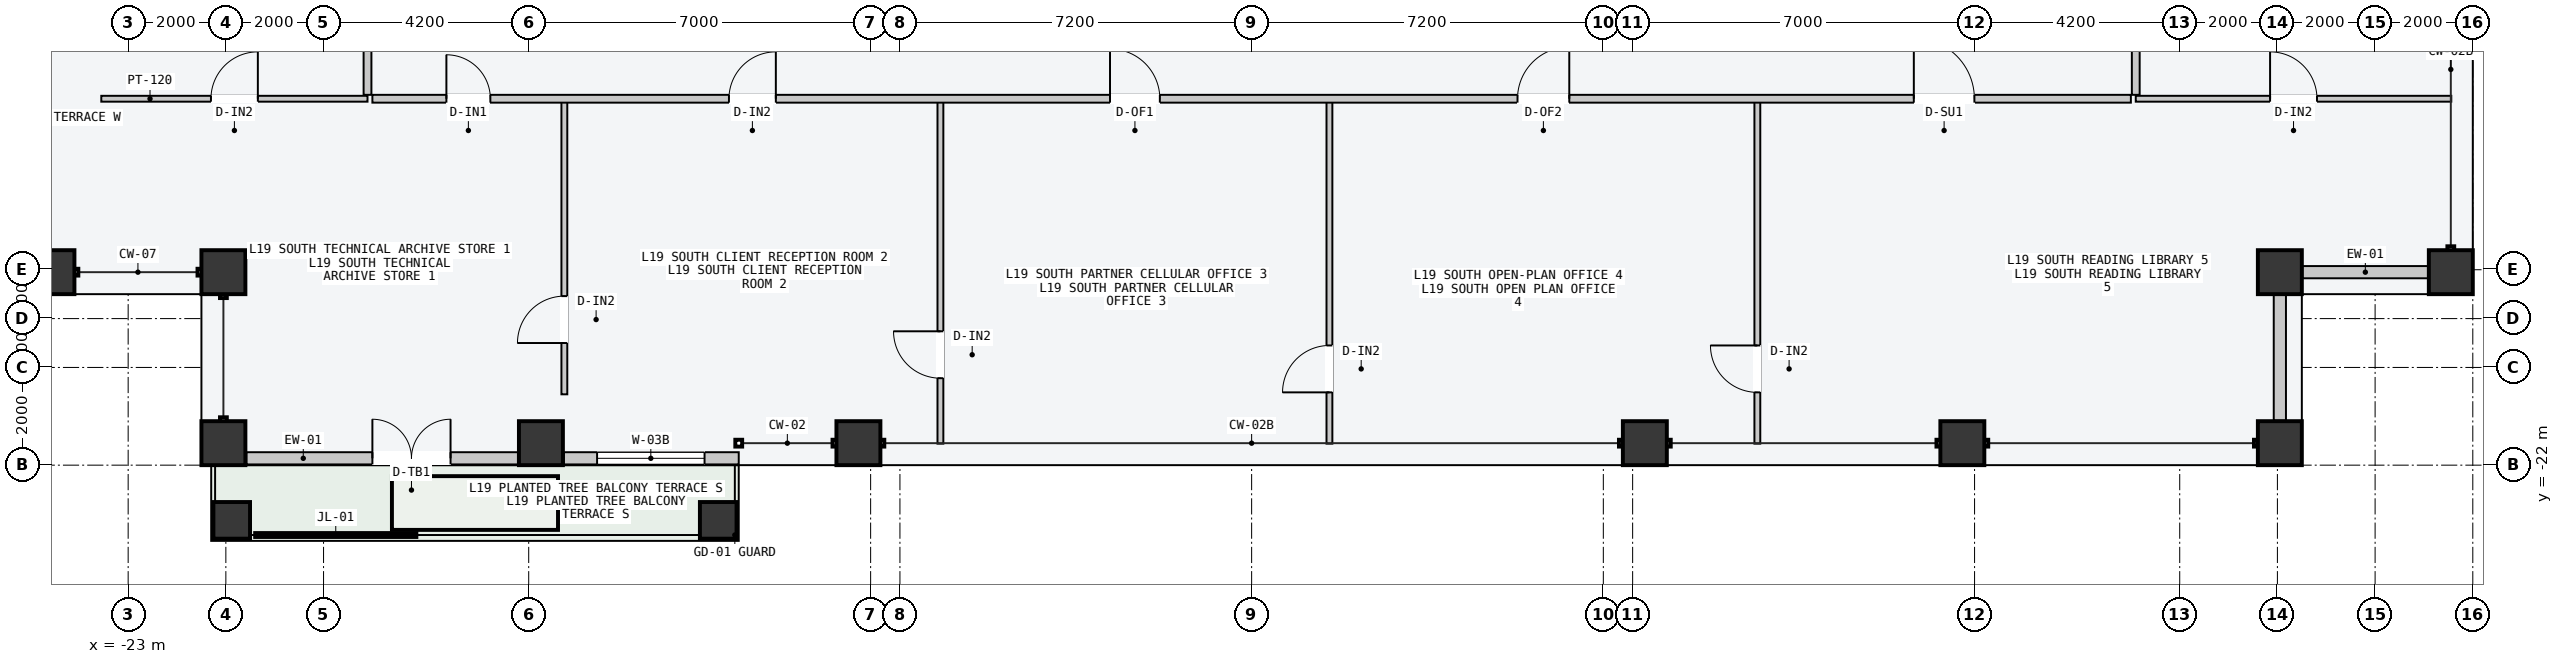
"""IFC4 building model, lengths in metres.
Left out: names, types, materials, properties, quantities, classifications, styles, units other than length and angle.
Written with IfcOpenShell. Run it as: python <this file> out.ifc"""

import sys

from ifc_helpers import new_model, si_unit, direction, frame, frame_2d, origin, origin_2d, place, context, subcontext, project, spatial, rectangle, hollow_rectangle, extrude, element, fill, save


model = new_model("IFC4")
c1 = context("Model", 3, precision=1e-05, world=origin(), true_north=direction((0.0, 1.0)))
c2 = subcontext(c1, "Body", "Model", "MODEL_VIEW")
j1 = project(units=[si_unit("LENGTHUNIT", "METRE"), si_unit("PLANEANGLEUNIT", "RADIAN")], contexts=[c1])
p1 = place(None, origin())
s1 = spatial("IfcSite", under=j1, at=p1, CompositionType="ELEMENT")
p2 = place(p1, origin())
s2 = spatial("IfcBuilding", under=s1, at=p2, CompositionType="ELEMENT")
p3 = place(p2, frame((0.0, 0.0, 74.4)))
s3 = spatial("IfcBuildingStorey", under=s2, at=p3, CompositionType="ELEMENT", Elevation=74.4)
for number, where, z_axis, x_axis in (
    (1, (-21.05, -21.55, 0.0), (0.0, 0.0, 1.0), (1.0, 0.0, 0.0)),
    (2, (-14.55, -21.55, 0.0), (0.0, 0.0, 1.0), (1.0, 0.0, 0.0)),
    (3, (-8.05, -21.55, 0.0), (0.0, 0.0, 1.0), (1.0, 0.0, 0.0)),
    (4, (8.05, -21.55, 0.0), (0.0, 0.0, 1.0), (1.0, 0.0, 0.0)),
    (5, (14.55, -21.55, 0.0), (0.0, 0.0, 1.0), (1.0, 0.0, 0.0)),
    (6, (21.05, -21.55, 0.0), (0.0, 0.0, 1.0), (1.0, 0.0, 0.0)),
    (7, (-24.55, -18.05, 0.0), (0.0, 0.0, 1.0), (0.0, 1.0, 0.0)),
    (8, (24.55, -18.05, 0.0), (0.0, 0.0, 1.0), (0.0, 1.0, 0.0)),
    (9, (21.05, -18.05, 0.0), (0.0, 0.0, 1.0), (1.0, 0.0, 0.0)),
    (10, (-21.05, -18.05, 0.0), (0.0, 0.0, 1.0), (1.0, 0.0, 0.0)),
):
    element("IfcColumn", number, at=place(p3, frame(where, z_axis=z_axis, x_axis=x_axis)), inside=s3, PredefinedType="COLUMN", context=c2, shape_type="SweptSolid", body=[
        extrude(hollow_rectangle(XDim=0.9, YDim=0.9, WallThickness=0.045, at=origin_2d()), origin(), (0.0, 0.0, 1.0), 3.6),
    ])
for number, where, z_axis, x_axis in (
    (11, (-20.88, -23.13, 0.0), (0.0, 0.0, 1.0), (1.0, 0.0, 0.0)),
    (12, (-10.92, -23.13, 0.0), (0.0, 0.0, 1.0), (1.0, 0.0, 0.0)),
):
    element("IfcColumn", number, at=place(p3, frame(where, z_axis=z_axis, x_axis=x_axis)), inside=s3, PredefinedType="COLUMN", context=c2, shape_type="SweptSolid", body=[
        extrude(hollow_rectangle(XDim=0.75, YDim=0.75, WallThickness=0.032, at=origin_2d()), origin(), (0.0, 0.0, 1.0), 3.6),
    ])
p4 = place(p3, frame((-20.58, -21.86, 0.0), z_axis=(0.0, 0.0, 1.0), x_axis=(1.0, 0.0, 0.0)))
e13 = element("IfcWall", 13, at=p4, inside=s3, PredefinedType="STANDARD", context=c2, shape_type="SweptSolid", body=[
    extrude(rectangle(XDim=5.56, YDim=0.25, at=frame_2d((2.78, 0.0))), origin(), (0.0, 0.0, 1.0), 3.4),
])
p5 = place(p4, frame((2.58, 0.0, 0.0)))
e14 = element("IfcOpeningElement", 14, at=p5, cuts=e13, PredefinedType="OPENING", context=c2, shape_type="SweptSolid", body=[
    extrude(rectangle(XDim=1.6, YDim=2.2, at=frame_2d((0.8, 1.1))), frame((0.0, 0.135, 0.0), z_axis=(0.0, -1.0, 0.0), x_axis=(1.0, 0.0, 0.0)), (0.0, 0.0, 1.0), 0.27),
])
p6 = place(p3, frame((-14.08, -21.86, 0.0), z_axis=(0.0, 0.0, 1.0), x_axis=(1.0, 0.0, 0.0)))
e15 = element("IfcWall", 15, at=p6, inside=s3, PredefinedType="STANDARD", context=c2, shape_type="SweptSolid", body=[
    extrude(rectangle(XDim=3.58, YDim=0.25, at=frame_2d((1.79, 0.0))), origin(), (0.0, 0.0, 1.0), 3.4),
])
p7 = place(p6, frame((0.68, 0.0, 0.85)))
e16 = element("IfcOpeningElement", 16, at=p7, cuts=e15, PredefinedType="OPENING", context=c2, shape_type="SweptSolid", body=[
    extrude(rectangle(XDim=2.2, YDim=2.1, at=frame_2d((1.1, 1.05))), frame((0.0, 0.135, 0.0), z_axis=(0.0, -1.0, 0.0), x_axis=(1.0, 0.0, 0.0)), (0.0, 0.0, 1.0), 0.27),
])
for number, where, z_axis, x_axis in (
    (17, (21.51, -18.05, 0.0), (0.0, 0.0, 1.0), (1.0, 0.0, 0.0)),
    (18, (21.05, -21.09, 0.0), (0.0, 0.0, 1.0), (0.0, 1.0, 0.0)),
):
    element("IfcWall", number, at=place(p3, frame(where, z_axis=z_axis, x_axis=x_axis)), inside=s3, PredefinedType="STANDARD", context=c2, shape_type="SweptSolid", body=[
        extrude(rectangle(XDim=2.58, YDim=0.25, at=frame_2d((1.29, 0.0))), origin(), (0.0, 0.0, 1.0), 2.7),
    ])
p8 = place(p3, frame((-14.07, -20.55, 0.0), z_axis=(0.0, 0.0, 1.0), x_axis=(0.0, 1.0, 0.0)))
e19 = element("IfcWall", 19, at=p8, inside=s3, PredefinedType="PARTITIONING", context=c2, shape_type="SweptSolid", body=[
    extrude(rectangle(XDim=5.99, YDim=0.12, at=frame_2d((2.995, 0.0))), origin(), (0.0, 0.0, 1.0), 3.4),
])
p9 = place(p8, frame((1.05, 0.0, 0.0)))
e20 = element("IfcOpeningElement", 20, at=p9, cuts=e19, PredefinedType="OPENING", context=c2, shape_type="SweptSolid", body=[
    extrude(rectangle(XDim=0.96, YDim=2.18, at=frame_2d((0.48, 1.09))), frame((0.0, 0.07, 0.0), z_axis=(0.0, -1.0, 0.0), x_axis=(1.0, 0.0, 0.0)), (0.0, 0.0, 1.0), 0.14),
])
p10 = place(p3, frame((-6.371, -21.56, 0.0), z_axis=(0.0, 0.0, 1.0), x_axis=(0.0, 1.0, 0.0)))
e21 = element("IfcWall", 21, at=p10, inside=s3, PredefinedType="PARTITIONING", context=c2, shape_type="SweptSolid", body=[
    extrude(rectangle(XDim=7.0, YDim=0.12, at=frame_2d((3.5, 0.0))), origin(), (0.0, 0.0, 1.0), 3.4),
])
p11 = place(p10, frame((1.34, 0.0, 0.0)))
e22 = element("IfcOpeningElement", 22, at=p11, cuts=e21, PredefinedType="OPENING", context=c2, shape_type="SweptSolid", body=[
    extrude(rectangle(XDim=0.96, YDim=2.18, at=frame_2d((0.48, 1.09))), frame((0.0, 0.07, 0.0), z_axis=(0.0, -1.0, 0.0), x_axis=(1.0, 0.0, 0.0)), (0.0, 0.0, 1.0), 0.14),
])
p12 = place(p3, frame((1.593, -21.56, 0.0), z_axis=(0.0, 0.0, 1.0), x_axis=(0.0, 1.0, 0.0)))
e23 = element("IfcWall", 23, at=p12, inside=s3, PredefinedType="PARTITIONING", context=c2, shape_type="SweptSolid", body=[
    extrude(rectangle(XDim=7.0, YDim=0.12, at=frame_2d((3.5, 0.0))), origin(), (0.0, 0.0, 1.0), 3.4),
])
p13 = place(p12, frame((1.05, 0.0, 0.0)))
e24 = element("IfcOpeningElement", 24, at=p13, cuts=e23, PredefinedType="OPENING", context=c2, shape_type="SweptSolid", body=[
    extrude(rectangle(XDim=0.96, YDim=2.18, at=frame_2d((0.48, 1.09))), frame((0.0, 0.07, 0.0), z_axis=(0.0, -1.0, 0.0), x_axis=(1.0, 0.0, 0.0)), (0.0, 0.0, 1.0), 0.14),
])
p14 = place(p3, frame((10.353, -21.56, 0.0), z_axis=(0.0, 0.0, 1.0), x_axis=(0.0, 1.0, 0.0)))
e25 = element("IfcWall", 25, at=p14, inside=s3, PredefinedType="PARTITIONING", context=c2, shape_type="SweptSolid", body=[
    extrude(rectangle(XDim=7.0, YDim=0.12, at=frame_2d((3.5, 0.0))), origin(), (0.0, 0.0, 1.0), 3.4),
])
p15 = place(p14, frame((1.05, 0.0, 0.0)))
e26 = element("IfcOpeningElement", 26, at=p15, cuts=e25, PredefinedType="OPENING", context=c2, shape_type="SweptSolid", body=[
    extrude(rectangle(XDim=0.96, YDim=2.18, at=frame_2d((0.48, 1.09))), frame((0.0, 0.07, 0.0), z_axis=(0.0, -1.0, 0.0), x_axis=(1.0, 0.0, 0.0)), (0.0, 0.0, 1.0), 0.14),
])
p16 = place(p3, frame((-18.0, -14.5, 0.0), z_axis=(0.0, 0.0, 1.0), x_axis=(1.0, 0.0, 0.0)))
e27 = element("IfcWall", 27, at=p16, inside=s3, PredefinedType="PARTITIONING", context=c2, shape_type="SweptSolid", body=[
    extrude(rectangle(XDim=36.0, YDim=0.16, at=frame_2d((18.0, 0.0))), origin(), (0.0, 0.0, 1.0), 3.4),
])
p17 = place(p16, frame((1.515, 0.0, 0.0)))
e28 = element("IfcOpeningElement", 28, at=p17, cuts=e27, PredefinedType="OPENING", context=c2, shape_type="SweptSolid", body=[
    extrude(rectangle(XDim=0.9, YDim=2.15, at=frame_2d((0.45, 1.075))), frame((0.0, 0.09, 0.0), z_axis=(0.0, -1.0, 0.0), x_axis=(1.0, 0.0, 0.0)), (0.0, 0.0, 1.0), 0.18),
])
p18 = place(p16, frame((7.299, 0.0, 0.0)))
e29 = element("IfcOpeningElement", 29, at=p18, cuts=e27, PredefinedType="OPENING", context=c2, shape_type="SweptSolid", body=[
    extrude(rectangle(XDim=0.96, YDim=2.18, at=frame_2d((0.48, 1.09))), frame((0.0, 0.09, 0.0), z_axis=(0.0, -1.0, 0.0), x_axis=(1.0, 0.0, 0.0)), (0.0, 0.0, 1.0), 0.18),
])
p19 = place(p16, frame((15.101, 0.0, 0.0)))
e30 = element("IfcOpeningElement", 30, at=p19, cuts=e27, PredefinedType="OPENING", context=c2, shape_type="SweptSolid", body=[
    extrude(rectangle(XDim=1.02, YDim=2.2, at=frame_2d((0.51, 1.1))), frame((0.0, 0.09, 0.0), z_axis=(0.0, -1.0, 0.0), x_axis=(1.0, 0.0, 0.0)), (0.0, 0.0, 1.0), 0.18),
])
p20 = place(p16, frame((23.443, 0.0, 0.0)))
e31 = element("IfcOpeningElement", 31, at=p20, cuts=e27, PredefinedType="OPENING", context=c2, shape_type="SweptSolid", body=[
    extrude(rectangle(XDim=1.06, YDim=2.2, at=frame_2d((0.53, 1.1))), frame((0.0, 0.09, 0.0), z_axis=(0.0, -1.0, 0.0), x_axis=(1.0, 0.0, 0.0)), (0.0, 0.0, 1.0), 0.18),
])
p21 = place(p16, frame((31.557, 0.0, 0.0)))
e32 = element("IfcOpeningElement", 32, at=p21, cuts=e27, PredefinedType="OPENING", context=c2, shape_type="SweptSolid", body=[
    extrude(rectangle(XDim=1.24, YDim=2.24, at=frame_2d((0.62, 1.12))), frame((0.0, 0.09, 0.0), z_axis=(0.0, -1.0, 0.0), x_axis=(1.0, 0.0, 0.0)), (0.0, 0.0, 1.0), 0.18),
])
p22 = place(p3, frame((-23.55, -14.5, 0.0), z_axis=(0.0, 0.0, 1.0), x_axis=(1.0, 0.0, 0.0)))
e33 = element("IfcWall", 33, at=p22, inside=s3, PredefinedType="PARTITIONING", context=c2, shape_type="SweptSolid", body=[
    extrude(rectangle(XDim=5.45, YDim=0.12, at=frame_2d((2.725, 0.0))), origin(), (0.0, 0.0, 1.0), 3.4),
])
p23 = place(p22, frame((2.245, 0.0, 0.0)))
e34 = element("IfcOpeningElement", 34, at=p23, cuts=e33, PredefinedType="OPENING", context=c2, shape_type="SweptSolid", body=[
    extrude(rectangle(XDim=0.96, YDim=2.18, at=frame_2d((0.48, 1.09))), frame((0.0, 0.07, 0.0), z_axis=(0.0, -1.0, 0.0), x_axis=(1.0, 0.0, 0.0)), (0.0, 0.0, 1.0), 0.14),
])
p24 = place(p3, frame((18.1, -14.5, 0.0), z_axis=(0.0, 0.0, 1.0), x_axis=(1.0, 0.0, 0.0)))
e35 = element("IfcWall", 35, at=p24, inside=s3, PredefinedType="PARTITIONING", context=c2, shape_type="SweptSolid", body=[
    extrude(rectangle(XDim=6.46, YDim=0.12, at=frame_2d((3.23, 0.0))), origin(), (0.0, 0.0, 1.0), 3.4),
])
p25 = place(p24, frame((2.75, 0.0, 0.0)))
e36 = element("IfcOpeningElement", 36, at=p25, cuts=e35, PredefinedType="OPENING", context=c2, shape_type="SweptSolid", body=[
    extrude(rectangle(XDim=0.96, YDim=2.18, at=frame_2d((0.48, 1.09))), frame((0.0, 0.07, 0.0), z_axis=(0.0, -1.0, 0.0), x_axis=(1.0, 0.0, 0.0)), (0.0, 0.0, 1.0), 0.14),
])
p26 = place(p3, frame((-18.1, -14.42, 0.0), z_axis=(0.0, 0.0, 1.0), x_axis=(0.0, 1.0, 0.0)))
e37 = element("IfcWall", 37, at=p26, inside=s3, PredefinedType="PARTITIONING", context=c2, shape_type="SweptSolid", body=[
    extrude(rectangle(XDim=28.84, YDim=0.16, at=frame_2d((14.42, 0.0))), origin(), (0.0, 0.0, 1.0), 3.4),
])
p27 = place(p26, frame((5.725, 0.0, 0.0)))
e38 = element("IfcOpeningElement", 38, at=p27, cuts=e37, PredefinedType="OPENING", context=c2, shape_type="SweptSolid", body=[
    extrude(rectangle(XDim=1.24, YDim=2.24, at=frame_2d((0.62, 1.12))), frame((0.0, 0.09, 0.0), z_axis=(0.0, -1.0, 0.0), x_axis=(1.0, 0.0, 0.0)), (0.0, 0.0, 1.0), 0.18),
])
p28 = place(p26, frame((16.46, 0.0, 0.0)))
e39 = element("IfcOpeningElement", 39, at=p28, cuts=e37, PredefinedType="OPENING", context=c2, shape_type="SweptSolid", body=[
    extrude(rectangle(XDim=1.4, YDim=2.2, at=frame_2d((0.7, 1.1))), frame((0.0, 0.09, 0.0), z_axis=(0.0, -1.0, 0.0), x_axis=(1.0, 0.0, 0.0)), (0.0, 0.0, 1.0), 0.18),
])
p29 = place(p26, frame((24.785, 0.0, 0.0)))
e40 = element("IfcOpeningElement", 40, at=p29, cuts=e37, PredefinedType="OPENING", context=c2, shape_type="SweptSolid", body=[
    extrude(rectangle(XDim=0.9, YDim=2.15, at=frame_2d((0.45, 1.075))), frame((0.0, 0.09, 0.0), z_axis=(0.0, -1.0, 0.0), x_axis=(1.0, 0.0, 0.0)), (0.0, 0.0, 1.0), 0.18),
])
p30 = place(p3, frame((18.1, -14.42, 0.0), z_axis=(0.0, 0.0, 1.0), x_axis=(0.0, 1.0, 0.0)))
e41 = element("IfcWall", 41, at=p30, inside=s3, PredefinedType="PARTITIONING", context=c2, shape_type="SweptSolid", body=[
    extrude(rectangle(XDim=28.84, YDim=0.16, at=frame_2d((14.42, 0.0))), origin(), (0.0, 0.0, 1.0), 3.4),
])
p31 = place(p30, frame((13.8, 0.0, 0.0)))
e42 = element("IfcOpeningElement", 42, at=p31, cuts=e41, PredefinedType="OPENING", context=c2, shape_type="SweptSolid", body=[
    extrude(rectangle(XDim=1.24, YDim=2.24, at=frame_2d((0.62, 1.12))), frame((0.0, 0.09, 0.0), z_axis=(0.0, -1.0, 0.0), x_axis=(1.0, 0.0, 0.0)), (0.0, 0.0, 1.0), 0.18),
])
p32 = place(p5, origin())
e43 = element("IfcDoor", 43, at=p32, inside=s3, OperationType="DOUBLE_DOOR_SINGLE_SWING", PredefinedType="DOOR", context=c2, shape_type="SweptSolid", body=[
    extrude(rectangle(XDim=1.6, YDim=2.2, at=frame_2d((0.8, 1.1))), frame((0.0, 0.025, 0.0), z_axis=(0.0, -1.0, 0.0), x_axis=(1.0, 0.0, 0.0)), (0.0, 0.0, 1.0), 0.05),
])
fill(e14, e43)
p33 = place(p7, origin())
e44 = element("IfcWindow", 44, at=p33, inside=s3, PartitioningType="SINGLE_PANEL", PredefinedType="WINDOW", context=c2, shape_type="SweptSolid", body=[
    extrude(rectangle(XDim=2.2, YDim=2.1, at=frame_2d((1.1, 1.05))), frame((0.0, 0.03, 0.0), z_axis=(0.0, -1.0, 0.0), x_axis=(1.0, 0.0, 0.0)), (0.0, 0.0, 1.0), 0.06),
])
fill(e16, e44)
p34 = place(p9, origin())
e45 = element("IfcDoor", 45, at=p34, inside=s3, OperationType="SINGLE_SWING_LEFT", PredefinedType="DOOR", context=c2, shape_type="SweptSolid", body=[
    extrude(rectangle(XDim=0.96, YDim=2.18, at=frame_2d((0.48, 1.09))), frame((0.0, 0.025, 0.0), z_axis=(0.0, -1.0, 0.0), x_axis=(1.0, 0.0, 0.0)), (0.0, 0.0, 1.0), 0.05),
])
fill(e20, e45)
p35 = place(p11, origin())
e46 = element("IfcDoor", 46, at=p35, inside=s3, OperationType="SINGLE_SWING_RIGHT", PredefinedType="DOOR", context=c2, shape_type="SweptSolid", body=[
    extrude(rectangle(XDim=0.96, YDim=2.18, at=frame_2d((0.48, 1.09))), frame((0.0, 0.025, 0.0), z_axis=(0.0, -1.0, 0.0), x_axis=(1.0, 0.0, 0.0)), (0.0, 0.0, 1.0), 0.05),
])
fill(e22, e46)
p36 = place(p13, origin())
e47 = element("IfcDoor", 47, at=p36, inside=s3, OperationType="SINGLE_SWING_LEFT", PredefinedType="DOOR", context=c2, shape_type="SweptSolid", body=[
    extrude(rectangle(XDim=0.96, YDim=2.18, at=frame_2d((0.48, 1.09))), frame((0.0, 0.025, 0.0), z_axis=(0.0, -1.0, 0.0), x_axis=(1.0, 0.0, 0.0)), (0.0, 0.0, 1.0), 0.05),
])
fill(e24, e47)
p37 = place(p15, origin())
e48 = element("IfcDoor", 48, at=p37, inside=s3, OperationType="SINGLE_SWING_RIGHT", PredefinedType="DOOR", context=c2, shape_type="SweptSolid", body=[
    extrude(rectangle(XDim=0.96, YDim=2.18, at=frame_2d((0.48, 1.09))), frame((0.0, 0.025, 0.0), z_axis=(0.0, -1.0, 0.0), x_axis=(1.0, 0.0, 0.0)), (0.0, 0.0, 1.0), 0.05),
])
fill(e26, e48)
p38 = place(p17, origin())
e49 = element("IfcDoor", 49, at=p38, inside=s3, OperationType="SINGLE_SWING_LEFT", PredefinedType="DOOR", context=c2, shape_type="SweptSolid", body=[
    extrude(rectangle(XDim=0.9, YDim=2.15, at=frame_2d((0.45, 1.075))), frame((0.0, 0.025, 0.0), z_axis=(0.0, -1.0, 0.0), x_axis=(1.0, 0.0, 0.0)), (0.0, 0.0, 1.0), 0.05),
])
fill(e28, e49)
p39 = place(p18, origin())
e50 = element("IfcDoor", 50, at=p39, inside=s3, OperationType="SINGLE_SWING_RIGHT", PredefinedType="DOOR", context=c2, shape_type="SweptSolid", body=[
    extrude(rectangle(XDim=0.96, YDim=2.18, at=frame_2d((0.48, 1.09))), frame((0.0, 0.025, 0.0), z_axis=(0.0, -1.0, 0.0), x_axis=(1.0, 0.0, 0.0)), (0.0, 0.0, 1.0), 0.05),
])
fill(e29, e50)
p40 = place(p19, origin())
e51 = element("IfcDoor", 51, at=p40, inside=s3, OperationType="SINGLE_SWING_LEFT", PredefinedType="DOOR", context=c2, shape_type="SweptSolid", body=[
    extrude(rectangle(XDim=1.02, YDim=2.2, at=frame_2d((0.51, 1.1))), frame((0.0, 0.025, 0.0), z_axis=(0.0, -1.0, 0.0), x_axis=(1.0, 0.0, 0.0)), (0.0, 0.0, 1.0), 0.05),
])
fill(e30, e51)
p41 = place(p20, origin())
e52 = element("IfcDoor", 52, at=p41, inside=s3, OperationType="SINGLE_SWING_RIGHT", PredefinedType="DOOR", context=c2, shape_type="SweptSolid", body=[
    extrude(rectangle(XDim=1.06, YDim=2.2, at=frame_2d((0.53, 1.1))), frame((0.0, 0.025, 0.0), z_axis=(0.0, -1.0, 0.0), x_axis=(1.0, 0.0, 0.0)), (0.0, 0.0, 1.0), 0.05),
])
fill(e31, e52)
p42 = place(p21, origin())
e53 = element("IfcDoor", 53, at=p42, inside=s3, OperationType="SINGLE_SWING_LEFT", PredefinedType="DOOR", context=c2, shape_type="SweptSolid", body=[
    extrude(rectangle(XDim=1.24, YDim=2.24, at=frame_2d((0.62, 1.12))), frame((0.0, 0.025, 0.0), z_axis=(0.0, -1.0, 0.0), x_axis=(1.0, 0.0, 0.0)), (0.0, 0.0, 1.0), 0.05),
])
fill(e32, e53)
p43 = place(p23, origin())
e54 = element("IfcDoor", 54, at=p43, inside=s3, OperationType="SINGLE_SWING_RIGHT", PredefinedType="DOOR", context=c2, shape_type="SweptSolid", body=[
    extrude(rectangle(XDim=0.96, YDim=2.18, at=frame_2d((0.48, 1.09))), frame((0.0, 0.025, 0.0), z_axis=(0.0, -1.0, 0.0), x_axis=(1.0, 0.0, 0.0)), (0.0, 0.0, 1.0), 0.05),
])
fill(e34, e54)
p44 = place(p25, origin())
e55 = element("IfcDoor", 55, at=p44, inside=s3, OperationType="SINGLE_SWING_LEFT", PredefinedType="DOOR", context=c2, shape_type="SweptSolid", body=[
    extrude(rectangle(XDim=0.96, YDim=2.18, at=frame_2d((0.48, 1.09))), frame((0.0, 0.025, 0.0), z_axis=(0.0, -1.0, 0.0), x_axis=(1.0, 0.0, 0.0)), (0.0, 0.0, 1.0), 0.05),
])
fill(e36, e55)
save(model, sys.argv[1])
